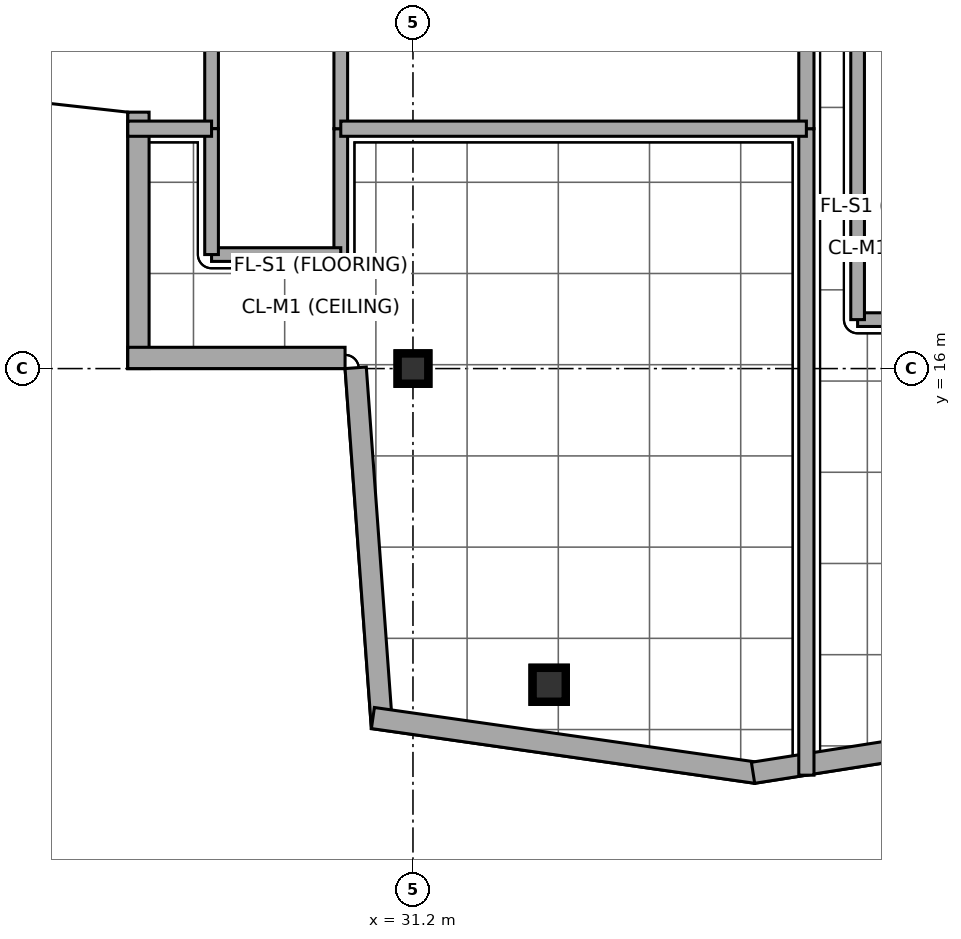
"""IFC4 building model, lengths in metres.
Left out: names, types, materials, properties, quantities, classifications, styles, units other than length and angle.
Written with IfcOpenShell. Run it as: python <this file> out.ifc"""

import sys

from ifc_helpers import new_model, si_unit, direction, frame, frame_2d, origin, origin_2d, place, context, subcontext, project, spatial, rectangle, i_section, extrude, element, fill, save


model = new_model("IFC4")
c1 = context("Model", 3, precision=1e-05, world=origin(), true_north=direction((0.0, 1.0)))
c2 = subcontext(c1, "Body", "Model", "MODEL_VIEW")
j1 = project(units=[si_unit("LENGTHUNIT", "METRE"), si_unit("PLANEANGLEUNIT", "RADIAN")], contexts=[c1])
p1 = place(None, origin())
s1 = spatial("IfcSite", under=j1, at=p1, CompositionType="ELEMENT")
p2 = place(p1, origin())
s2 = spatial("IfcBuilding", under=s1, at=p2, CompositionType="ELEMENT")
p3 = place(p2, frame((0.0, 0.0, 327.6)))
s3 = spatial("IfcBuildingStorey", under=s2, at=p3, CompositionType="ELEMENT", Elevation=327.6)
p4 = place(p3, frame((31.2, 16.0, 0.0), z_axis=(0.0, 0.0, 1.0), x_axis=(1.0, 0.0, 0.0)))
e1 = element("IfcColumn", 1, at=p4, inside=s3, PredefinedType="COLUMN", context=c2, shape_type="SweptSolid", body=[
    extrude(i_section(OverallWidth=0.373, OverallDepth=0.368, WebThickness=0.015, FlangeThickness=0.024, at=origin_2d()), origin(), (0.0, 0.0, 1.0), 4.794),
])
p5 = place(p3, frame((32.992, 11.84, 0.016), z_axis=(0.02346612672, 0.050255343281, 0.99846068594), x_axis=(-0.906088923183, 0.423087299838, 0.0)))
e2 = element("IfcColumn", 2, at=p5, inside=s3, PredefinedType="COLUMN", context=c2, shape_type="SweptSolid", body=[
    extrude(i_section(OverallWidth=0.406, OverallDepth=0.416, WebThickness=0.03, FlangeThickness=0.048, at=origin_2d()), origin(), (0.0, 0.0, 1.0), 4.775),
])
p6 = place(p3, frame((27.588, 19.374, 0.0), z_axis=(0.0, 0.0, 1.0), x_axis=(0.0, -1.0, 0.0)))
e3 = element("IfcWall", 3, at=p6, inside=s3, PredefinedType="STANDARD", context=c2, shape_type="SweptSolid", body=[
    extrude(rectangle(XDim=3.374, YDim=0.28, at=frame_2d((1.687, 0.0))), origin(), (0.0, 0.0, 1.0), 4.009),
])
p7 = place(p3, frame((27.448, 16.14, 0.0), z_axis=(0.0, 0.0, 1.0), x_axis=(1.0, 0.0, 0.0)))
e4 = element("IfcWall", 4, at=p7, inside=s3, PredefinedType="STANDARD", context=c2, shape_type="SweptSolid", body=[
    extrude(rectangle(XDim=2.858, YDim=0.28, at=frame_2d((1.429, 0.0))), origin(), (0.0, 0.0, 1.0), 4.48),
])
p8 = place(p3, frame((30.446, 16.01, 0.0), z_axis=(0.0, 0.0, 1.0), x_axis=(0.072953187508, -0.997335366079, 0.0)))
e5 = element("IfcWall", 5, at=p8, inside=s3, PredefinedType="STANDARD", context=c2, shape_type="SweptSolid", body=[
    extrude(rectangle(XDim=4.749, YDim=0.28, at=frame_2d((2.375, 0.0))), origin(), (0.0, 0.0, 1.0), 4.48),
])
p9 = place(p3, frame((30.673, 11.403, 0.0), z_axis=(0.0, 0.0, 1.0), x_axis=(0.989962907882, -0.141327424861, 0.0)))
e6 = element("IfcWall", 6, at=p9, inside=s3, PredefinedType="STANDARD", context=c2, shape_type="SweptSolid", body=[
    extrude(rectangle(XDim=5.094, YDim=0.28, at=frame_2d((2.547, 0.0))), origin(), (0.0, 0.0, 1.0), 4.48),
])
p10 = place(p3, frame((35.674, 10.682, 0.0), z_axis=(0.0, 0.0, 1.0), x_axis=(0.987892522015, 0.155139823857, 0.0)))
e7 = element("IfcWall", 7, at=p10, inside=s3, PredefinedType="STANDARD", context=c2, shape_type="SweptSolid", body=[
    extrude(rectangle(XDim=5.105, YDim=0.28, at=frame_2d((2.552, 0.0))), origin(), (0.0, 0.0, 1.0), 4.48),
])
p11 = place(p3, frame((37.05, 16.644, 0.0), z_axis=(0.0, 0.0, 1.0), x_axis=(1.0, 0.0, 0.0)))
e8 = element("IfcWall", 8, at=p11, inside=s3, PredefinedType="SOLIDWALL", context=c2, shape_type="SweptSolid", body=[
    extrude(rectangle(XDim=1.9, YDim=0.18, at=frame_2d((0.95, 0.0))), origin(), (0.0, 0.0, 1.0), 4.48),
])
p12 = place(p11, frame((0.345, 0.0, 0.0)))
e9 = element("IfcOpeningElement", 9, at=p12, cuts=e8, PredefinedType="OPENING", context=c2, shape_type="SweptSolid", body=[
    extrude(rectangle(XDim=0.85, YDim=2.15, at=frame_2d((0.425, 1.075))), frame((0.0, 0.1, 0.0), z_axis=(0.0, -1.0, 0.0), x_axis=(1.0, 0.0, 0.0)), (0.0, 0.0, 1.0), 0.2),
])
p13 = place(p3, frame((30.25, 17.5, 0.0), z_axis=(0.0, 0.0, 1.0), x_axis=(0.0, 1.0, 0.0)))
e10 = element("IfcWall", 10, at=p13, inside=s3, PredefinedType="SOLIDWALL", context=c2, shape_type="SweptSolid", body=[
    extrude(rectangle(XDim=1.656, YDim=0.18, at=frame_2d((0.828, 0.0))), origin(), (0.0, 0.0, 1.0), 4.48),
])
p14 = place(p13, frame((0.353, 0.0, 0.0)))
e11 = element("IfcOpeningElement", 11, at=p14, cuts=e10, PredefinedType="OPENING", context=c2, shape_type="SweptSolid", body=[
    extrude(rectangle(XDim=0.95, YDim=2.15, at=frame_2d((0.475, 1.075))), frame((0.0, 0.1, 0.0), z_axis=(0.0, -1.0, 0.0), x_axis=(1.0, 0.0, 0.0)), (0.0, 0.0, 1.0), 0.2),
])
p15 = place(p3, frame((28.55, 19.156, 0.0), z_axis=(0.0, 0.0, 1.0), x_axis=(0.0, 1.0, 0.0)))
e12 = element("IfcWall", 12, at=p15, inside=s3, PredefinedType="SOLIDWALL", context=c2, shape_type="SweptSolid", body=[
    extrude(rectangle(XDim=3.744, YDim=0.18, at=frame_2d((1.872, 0.0))), origin(), (0.0, 0.0, 1.0), 4.48),
])
p16 = place(p15, frame((1.397, 0.0, 0.0)))
e13 = element("IfcOpeningElement", 13, at=p16, cuts=e12, PredefinedType="OPENING", context=c2, shape_type="SweptSolid", body=[
    extrude(rectangle(XDim=0.95, YDim=2.15, at=frame_2d((0.475, 1.075))), frame((0.0, 0.1, 0.0), z_axis=(0.0, -1.0, 0.0), x_axis=(1.0, 0.0, 0.0)), (0.0, 0.0, 1.0), 0.2),
])
p17 = place(p3, frame((30.25, 19.156, 0.0), z_axis=(0.0, 0.0, 1.0), x_axis=(0.0, 1.0, 0.0)))
e14 = element("IfcWall", 14, at=p17, inside=s3, PredefinedType="SOLIDWALL", context=c2, shape_type="SweptSolid", body=[
    extrude(rectangle(XDim=7.694, YDim=0.18, at=frame_2d((3.847, 0.0))), origin(), (0.0, 0.0, 1.0), 3.94),
])
p18 = place(p17, frame((2.292, 0.0, 0.0)))
e15 = element("IfcOpeningElement", 15, at=p18, cuts=e14, PredefinedType="OPENING", context=c2, shape_type="SweptSolid", body=[
    extrude(rectangle(XDim=0.95, YDim=2.15, at=frame_2d((0.475, 1.075))), frame((0.0, 0.1, 0.0), z_axis=(0.0, -1.0, 0.0), x_axis=(1.0, 0.0, 0.0)), (0.0, 0.0, 1.0), 0.2),
])
p19 = place(p3, frame((37.05, 16.644, 0.0), z_axis=(0.0, 0.0, 1.0), x_axis=(0.0, 1.0, 0.0)))
e16 = element("IfcWall", 16, at=p19, inside=s3, PredefinedType="SOLIDWALL", context=c2, shape_type="SweptSolid", body=[
    extrude(rectangle(XDim=10.206, YDim=0.18, at=frame_2d((5.103, 0.0))), origin(), (0.0, 0.0, 1.0), 4.21),
])
p20 = place(p3, frame((28.55, 17.5, 0.0), z_axis=(0.0, 0.0, 1.0), x_axis=(1.0, 0.0, 0.0)))
e17 = element("IfcWall", 17, at=p20, inside=s3, PredefinedType="SOLIDWALL", context=c2, shape_type="SweptSolid", body=[
    extrude(rectangle(XDim=1.7, YDim=0.18, at=frame_2d((0.85, 0.0))), origin(), (0.0, 0.0, 1.0), 4.48),
])
p21 = place(p3, frame((28.55, 17.5, 0.0), z_axis=(0.0, 0.0, 1.0), x_axis=(0.0, 1.0, 0.0)))
e18 = element("IfcWall", 18, at=p21, inside=s3, PredefinedType="SOLIDWALL", context=c2, shape_type="SweptSolid", body=[
    extrude(rectangle(XDim=1.656, YDim=0.18, at=frame_2d((0.828, 0.0))), origin(), (0.0, 0.0, 1.0), 4.48),
])
p22 = place(p3, frame((36.376, 10.651, 0.0), z_axis=(0.0, 0.0, 1.0), x_axis=(0.0, 1.0, 0.0)))
e19 = element("IfcWall", 19, at=p22, inside=s3, PredefinedType="SOLIDWALL", context=c2, shape_type="SweptSolid", body=[
    extrude(rectangle(XDim=8.505, YDim=0.2, at=frame_2d((4.252, 0.0))), origin(), (0.0, 0.0, 1.0), 3.94),
])
p23 = place(p3, frame((36.376, 19.156, 0.0), z_axis=(0.0, 0.0, 1.0), x_axis=(0.0, 1.0, 0.0)))
e20 = element("IfcWall", 20, at=p23, inside=s3, PredefinedType="SOLIDWALL", context=c2, shape_type="SweptSolid", body=[
    extrude(rectangle(XDim=1.824, YDim=0.2, at=frame_2d((0.912, 0.0))), origin(), (0.0, 0.0, 1.0), 4.21),
])
p24 = place(p3, frame((27.448, 19.156, 0.0), z_axis=(0.0, 0.0, 1.0), x_axis=(1.0, 0.0, 0.0)))
e21 = element("IfcWall", 21, at=p24, inside=s3, PredefinedType="SOLIDWALL", context=c2, shape_type="SweptSolid", body=[
    extrude(rectangle(XDim=1.102, YDim=0.2, at=frame_2d((0.551, 0.0))), origin(), (0.0, 0.0, 1.0), 4.48),
])
p25 = place(p3, frame((30.25, 19.156, 0.0), z_axis=(0.0, 0.0, 1.0), x_axis=(1.0, 0.0, 0.0)))
e22 = element("IfcWall", 22, at=p25, inside=s3, PredefinedType="SOLIDWALL", context=c2, shape_type="SweptSolid", body=[
    extrude(rectangle(XDim=6.126, YDim=0.2, at=frame_2d((3.063, 0.0))), origin(), (0.0, 0.0, 1.0), 3.94),
])
p26 = place(p14, frame((0.95, 0.0, 0.0), z_axis=(0.0, 0.0, 1.0), x_axis=(-1.0, 0.0, 0.0)))
e23 = element("IfcDoor", 23, at=p26, inside=s3, OperationType="SINGLE_SWING_RIGHT", PredefinedType="DOOR", context=c2, shape_type="SweptSolid", body=[
    extrude(rectangle(XDim=0.95, YDim=2.15, at=frame_2d((0.475, 1.075))), frame((0.0, 0.025, 0.0), z_axis=(0.0, -1.0, 0.0), x_axis=(1.0, 0.0, 0.0)), (0.0, 0.0, 1.0), 0.05),
])
fill(e11, e23)
save(model, sys.argv[1])
